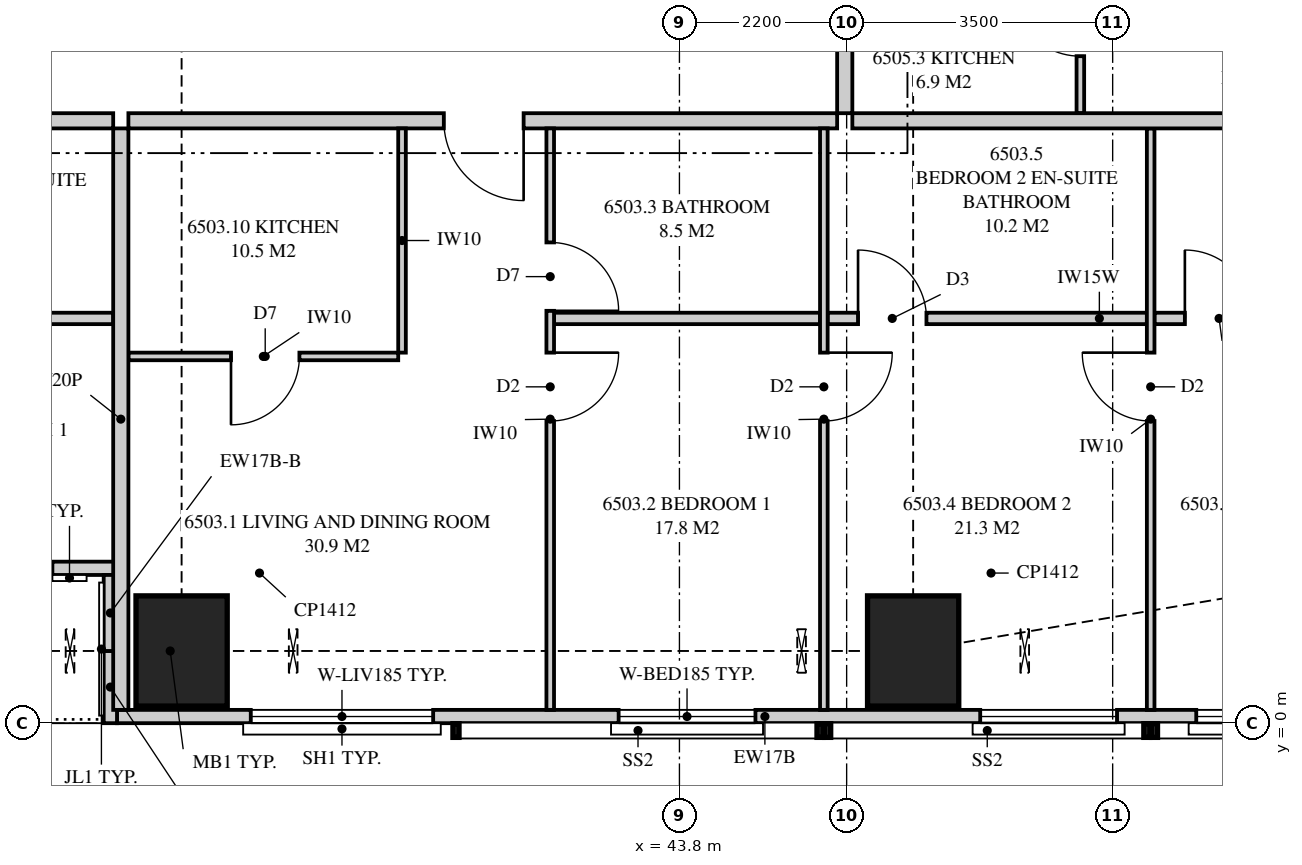
"""IFC4 building model, lengths in metres.
Left out: names, types, materials, properties, quantities, classifications, styles, units other than length and angle.
Written with IfcOpenShell. Run it as: python <this file> out.ifc"""

import sys

from ifc_helpers import new_model, si_unit, direction, frame, frame_2d, origin, origin_2d, place, context, subcontext, project, spatial, polyline, rectangle, outline, extrude, element, fill, save


model = new_model("IFC4")
c1 = context("Model", 3, precision=1e-05, world=origin(), true_north=direction((0.0, 1.0)))
c2 = subcontext(c1, "Body", "Model", "MODEL_VIEW")
j1 = project(units=[si_unit("LENGTHUNIT", "METRE"), si_unit("PLANEANGLEUNIT", "RADIAN")], contexts=[c1])
p1 = place(None, origin())
s1 = spatial("IfcSite", under=j1, at=p1, CompositionType="ELEMENT")
p2 = place(p1, origin())
s2 = spatial("IfcBuilding", under=s1, at=p2, CompositionType="ELEMENT")
p3 = place(p2, frame((0.0, 0.0, 238.95)))
s3 = spatial("IfcBuildingStorey", under=s2, at=p3, CompositionType="ELEMENT", Elevation=238.95)
for number, where, z_axis, x_axis in (
    (1, (37.25, 0.95, 0.0), (0.0, 0.0, 1.0), (0.0, 1.0, 0.0)),
    (2, (46.875, 0.95, 0.0), (0.0, 0.0, 1.0), (0.0, 1.0, 0.0)),
):
    element("IfcColumn", number, at=place(p3, frame(where, z_axis=z_axis, x_axis=x_axis)), inside=s3, PredefinedType="COLUMN", context=c2, shape_type="SweptSolid", body=[
        extrude(rectangle(XDim=1.45, YDim=1.2, at=origin_2d()), origin(), (0.0, 0.0, 1.0), 3.5),
    ])
p4 = place(p3, frame((36.4, 0.087, 0.0), z_axis=(0.0, 0.0, 1.0), x_axis=(1.0, 0.0, 0.0)))
e3 = element("IfcWall", 3, at=p4, inside=s3, PredefinedType="SOLIDWALL", context=c2, shape_type="SweptSolid", body=[
    extrude(outline(polyline([(0.0, 0.0), (17.049, 0.0), (17.049, 3.26), (10.69, 3.26), (10.69, 2.3), (10.606, 2.3), (10.606, 3.26), (10.475, 3.26), (10.475, 2.3), (0.0, 2.3), (0.0, 0.0)])), frame((0.0, 0.087, 0.0), z_axis=(0.0, -1.0, 0.0), x_axis=(1.0, 0.0, 0.0)), (0.0, 0.0, 1.0), 0.175),
])
p5 = place(p4, frame((1.76, 0.0, 0.4)))
e4 = element("IfcOpeningElement", 4, at=p5, cuts=e3, PredefinedType="OPENING", context=c2, shape_type="SweptSolid", body=[
    extrude(rectangle(XDim=2.4, YDim=1.85, at=frame_2d((1.2, 0.925))), frame((0.0, 0.097, 0.0), z_axis=(0.0, -1.0, 0.0), x_axis=(1.0, 0.0, 0.0)), (0.0, 0.0, 1.0), 0.195),
])
p6 = place(p4, frame((6.6, 0.0, 0.4)))
e5 = element("IfcOpeningElement", 5, at=p6, cuts=e3, PredefinedType="OPENING", context=c2, shape_type="SweptSolid", body=[
    extrude(rectangle(XDim=1.8, YDim=1.85, at=frame_2d((0.9, 0.925))), frame((0.0, 0.097, 0.0), z_axis=(0.0, -1.0, 0.0), x_axis=(1.0, 0.0, 0.0)), (0.0, 0.0, 1.0), 0.195),
])
p7 = place(p4, frame((11.357, 0.0, 0.4)))
e6 = element("IfcOpeningElement", 6, at=p7, cuts=e3, PredefinedType="OPENING", context=c2, shape_type="SweptSolid", body=[
    extrude(rectangle(XDim=1.8, YDim=1.85, at=frame_2d((0.9, 0.925))), frame((0.0, 0.097, 0.0), z_axis=(0.0, -1.0, 0.0), x_axis=(1.0, 0.0, 0.0)), (0.0, 0.0, 1.0), 0.195),
])
p8 = place(p4, frame((14.2, 0.0, 0.4)))
e7 = element("IfcOpeningElement", 7, at=p8, cuts=e3, PredefinedType="OPENING", context=c2, shape_type="SweptSolid", body=[
    extrude(rectangle(XDim=1.8, YDim=1.85, at=frame_2d((0.9, 0.925))), frame((0.0, 0.097, 0.0), z_axis=(0.0, -1.0, 0.0), x_axis=(1.0, 0.0, 0.0)), (0.0, 0.0, 1.0), 0.195),
])
p9 = place(p3, frame((32.9, 2.038, 0.0), z_axis=(0.0, 0.0, 1.0), x_axis=(1.0, 0.0, 0.0)))
e8 = element("IfcWall", 8, at=p9, inside=s3, PredefinedType="SOLIDWALL", context=c2, shape_type="SweptSolid", body=[
    extrude(outline(polyline([(0.0, 0.0), (3.5, 0.0), (3.5, 2.66), (3.15, 2.66), (3.15, 3.26), (0.0, 3.26), (0.0, 0.0)])), frame((0.0, 0.087, 0.0), z_axis=(0.0, -1.0, 0.0), x_axis=(1.0, 0.0, 0.0)), (0.0, 0.0, 1.0), 0.175),
])
p10 = place(p9, frame((0.85, 0.0, 0.0)))
e9 = element("IfcOpeningElement", 9, at=p10, cuts=e8, PredefinedType="OPENING", context=c2, shape_type="SweptSolid", body=[
    extrude(rectangle(XDim=1.8, YDim=2.25, at=frame_2d((0.9, 1.125))), frame((0.0, 0.097, 0.0), z_axis=(0.0, -1.0, 0.0), x_axis=(1.0, 0.0, 0.0)), (0.0, 0.0, 1.0), 0.195),
])
p11 = place(p3, frame((36.312, 0.0, 0.0), z_axis=(0.0, 0.0, 1.0), x_axis=(0.0, 1.0, 0.0)))
e10 = element("IfcWall", 10, at=p11, inside=s3, PredefinedType="SOLIDWALL", context=c2, shape_type="SweptSolid", body=[
    extrude(outline(polyline([(0.0, 0.0), (0.95, 0.0), (0.95, 2.3), (0.15, 2.3), (0.15, 3.26), (0.0, 3.26), (0.0, 0.0)])), frame((0.0, 0.087, 0.0), z_axis=(0.0, -1.0, 0.0), x_axis=(1.0, 0.0, 0.0)), (0.0, 0.0, 1.0), 0.175),
])
p12 = place(p3, frame((36.312, 0.95, 0.0), z_axis=(0.0, 0.0, 1.0), x_axis=(0.0, 1.0, 0.0)))
e11 = element("IfcWall", 11, at=p12, inside=s3, PredefinedType="SOLIDWALL", context=c2, shape_type="SweptSolid", body=[
    extrude(outline(polyline([(0.0, 0.0), (1.0, 0.0), (1.0, 2.66), (0.8, 2.66), (0.8, 2.3), (0.0, 2.3), (0.0, 0.0)])), frame((0.0, 0.087, 0.0), z_axis=(0.0, -1.0, 0.0), x_axis=(1.0, 0.0, 0.0)), (0.0, 0.0, 1.0), 0.175),
])
p13 = place(p3, frame((36.45, 0.175, 0.0), z_axis=(0.0, 0.0, 1.0), x_axis=(0.0, 1.0, 0.0)))
e12 = element("IfcWall", 12, at=p13, inside=s3, PredefinedType="PARTITIONING", context=c2, shape_type="SweptSolid", body=[
    extrude(outline(polyline([(0.0, 0.0), (7.65, 0.0), (7.65, 3.26), (7.65, 2.66), (1.685, 2.66), (1.685, 2.3), (0.0, 2.3), (0.0, 3.26), (0.0, 0.0)])), frame((0.0, 0.1, 0.0), z_axis=(0.0, -1.0, 0.0), x_axis=(1.0, 0.0, 0.0)), (0.0, 0.0, 1.0), 0.2),
])
p14 = place(p3, frame((26.7, 7.925, 0.0), z_axis=(0.0, 0.0, 1.0), x_axis=(1.0, 0.0, 0.0)))
e13 = element("IfcWall", 13, at=p14, inside=s3, PredefinedType="PARTITIONING", context=c2, shape_type="SweptSolid", body=[
    extrude(outline(polyline([(0.0, 0.0), (9.65, 0.0), (9.65, 3.26), (9.65, 2.66), (9.24, 2.66), (9.24, 3.26), (2.235, 3.26), (2.235, 2.66), (0.0, 2.66), (0.0, 3.26), (0.0, 0.0)])), frame((0.0, 0.1, 0.0), z_axis=(0.0, -1.0, 0.0), x_axis=(1.0, 0.0, 0.0)), (0.0, 0.0, 1.0), 0.2),
])
p15 = place(p14, frame((4.325, 0.0, 0.0)))
e14 = element("IfcOpeningElement", 14, at=p15, cuts=e13, PredefinedType="OPENING", context=c2, shape_type="SweptSolid", body=[
    extrude(rectangle(XDim=1.05, YDim=2.2, at=frame_2d((0.525, 1.1))), frame((0.0, 0.11, 0.0), z_axis=(0.0, -1.0, 0.0), x_axis=(1.0, 0.0, 0.0)), (0.0, 0.0, 1.0), 0.22),
])
p16 = place(p3, frame((32.9, 5.325, 0.0), z_axis=(0.0, 0.0, 1.0), x_axis=(1.0, 0.0, 0.0)))
e15 = element("IfcWall", 15, at=p16, inside=s3, PredefinedType="PLUMBINGWALL", context=c2, shape_type="SweptSolid", body=[
    extrude(outline(polyline([(0.0, 0.0), (3.45, 0.0), (3.45, 3.26), (3.45, 2.66), (3.065, 2.66), (3.065, 3.26), (0.0, 3.26), (0.0, 0.0)])), frame((0.0, 0.075, 0.0), z_axis=(0.0, -1.0, 0.0), x_axis=(1.0, 0.0, 0.0)), (0.0, 0.0, 1.0), 0.15),
])
p17 = place(p16, frame((0.4, 0.0, 0.0)))
e16 = element("IfcOpeningElement", 16, at=p17, cuts=e15, PredefinedType="OPENING", context=c2, shape_type="SweptSolid", body=[
    extrude(rectangle(XDim=0.9, YDim=2.1, at=frame_2d((0.45, 1.05))), frame((0.0, 0.085, 0.0), z_axis=(0.0, -1.0, 0.0), x_axis=(1.0, 0.0, 0.0)), (0.0, 0.0, 1.0), 0.17),
])
p18 = place(p3, frame((36.55, 7.925, 0.0), z_axis=(0.0, 0.0, 1.0), x_axis=(1.0, 0.0, 0.0)))
e17 = element("IfcWall", 17, at=p18, inside=s3, PredefinedType="PARTITIONING", context=c2, shape_type="SweptSolid", body=[
    extrude(outline(polyline([(0.0, 0.0), (9.325, 0.0), (9.325, 3.26), (9.325, 2.66), (9.015, 2.66), (9.015, 3.26), (2.01, 3.26), (2.01, 2.66), (0.0, 2.66), (0.0, 3.26), (0.0, 0.0)])), frame((0.0, 0.1, 0.0), z_axis=(0.0, -1.0, 0.0), x_axis=(1.0, 0.0, 0.0)), (0.0, 0.0, 1.0), 0.2),
])
p19 = place(p18, frame((4.15, 0.0, 0.0)))
e18 = element("IfcOpeningElement", 18, at=p19, cuts=e17, PredefinedType="OPENING", context=c2, shape_type="SweptSolid", body=[
    extrude(rectangle(XDim=1.05, YDim=2.2, at=frame_2d((0.525, 1.1))), frame((0.0, 0.11, 0.0), z_axis=(0.0, -1.0, 0.0), x_axis=(1.0, 0.0, 0.0)), (0.0, 0.0, 1.0), 0.22),
])
p20 = place(p3, frame((42.1, 0.175, 0.0), z_axis=(0.0, 0.0, 1.0), x_axis=(0.0, 1.0, 0.0)))
e19 = element("IfcWall", 19, at=p20, inside=s3, PredefinedType="PARTITIONING", context=c2, shape_type="SweptSolid", body=[
    extrude(outline(polyline([(0.0, 0.0), (7.65, 0.0), (7.65, 3.26), (1.635, 3.26), (1.635, 2.3), (0.0, 2.3), (0.0, 3.26), (0.0, 0.0)])), frame((0.0, 0.05, 0.0), z_axis=(0.0, -1.0, 0.0), x_axis=(1.0, 0.0, 0.0)), (0.0, 0.0, 1.0), 0.1),
])
p21 = place(p20, frame((3.8, 0.0, 0.0)))
e20 = element("IfcOpeningElement", 20, at=p21, cuts=e19, PredefinedType="OPENING", context=c2, shape_type="SweptSolid", body=[
    extrude(rectangle(XDim=0.9, YDim=2.1, at=frame_2d((0.45, 1.05))), frame((0.0, 0.06, 0.0), z_axis=(0.0, -1.0, 0.0), x_axis=(1.0, 0.0, 0.0)), (0.0, 0.0, 1.0), 0.12),
])
p22 = place(p20, frame((5.25, 0.0, 0.0)))
e21 = element("IfcOpeningElement", 21, at=p22, cuts=e19, PredefinedType="OPENING", context=c2, shape_type="SweptSolid", body=[
    extrude(rectangle(XDim=0.9, YDim=2.1, at=frame_2d((0.45, 1.05))), frame((0.0, 0.06, 0.0), z_axis=(0.0, -1.0, 0.0), x_axis=(1.0, 0.0, 0.0)), (0.0, 0.0, 1.0), 0.12),
])
p23 = place(p3, frame((45.7, 0.175, 0.0), z_axis=(0.0, 0.0, 1.0), x_axis=(0.0, 1.0, 0.0)))
e22 = element("IfcWall", 22, at=p23, inside=s3, PredefinedType="PARTITIONING", context=c2, shape_type="SweptSolid", body=[
    extrude(outline(polyline([(0.0, 0.0), (7.65, 0.0), (7.65, 3.26), (7.65, 2.66), (1.635, 2.66), (1.635, 2.3), (0.0, 2.3), (0.0, 3.26), (0.0, 0.0)])), frame((0.0, 0.05, 0.0), z_axis=(0.0, -1.0, 0.0), x_axis=(1.0, 0.0, 0.0)), (0.0, 0.0, 1.0), 0.1),
])
p24 = place(p23, frame((3.8, 0.0, 0.0)))
e23 = element("IfcOpeningElement", 23, at=p24, cuts=e22, PredefinedType="OPENING", context=c2, shape_type="SweptSolid", body=[
    extrude(rectangle(XDim=0.9, YDim=2.1, at=frame_2d((0.45, 1.05))), frame((0.0, 0.06, 0.0), z_axis=(0.0, -1.0, 0.0), x_axis=(1.0, 0.0, 0.0)), (0.0, 0.0, 1.0), 0.12),
])
p25 = place(p3, frame((50.0, 0.175, 0.0), z_axis=(0.0, 0.0, 1.0), x_axis=(0.0, 1.0, 0.0)))
e24 = element("IfcWall", 24, at=p25, inside=s3, PredefinedType="PARTITIONING", context=c2, shape_type="SweptSolid", body=[
    extrude(outline(polyline([(0.0, 0.0), (7.65, 0.0), (7.65, 3.26), (2.177, 3.26), (2.177, 2.3), (0.432, 2.3), (0.432, 3.26), (0.0, 3.26), (0.0, 0.0)])), frame((0.0, 0.05, 0.0), z_axis=(0.0, -1.0, 0.0), x_axis=(1.0, 0.0, 0.0)), (0.0, 0.0, 1.0), 0.1),
])
p26 = place(p25, frame((3.8, 0.0, 0.0)))
e25 = element("IfcOpeningElement", 25, at=p26, cuts=e24, PredefinedType="OPENING", context=c2, shape_type="SweptSolid", body=[
    extrude(rectangle(XDim=0.9, YDim=2.1, at=frame_2d((0.45, 1.05))), frame((0.0, 0.06, 0.0), z_axis=(0.0, -1.0, 0.0), x_axis=(1.0, 0.0, 0.0)), (0.0, 0.0, 1.0), 0.12),
])
p27 = place(p3, frame((42.15, 5.325, 0.0), z_axis=(0.0, 0.0, 1.0), x_axis=(1.0, 0.0, 0.0)))
e26 = element("IfcWall", 26, at=p27, inside=s3, PredefinedType="PLUMBINGWALL", context=c2, shape_type="SweptSolid", body=[
    extrude(outline(polyline([(0.0, 0.0), (3.5, 0.0), (3.5, 3.26), (3.5, 2.66), (3.44, 2.66), (3.44, 3.26), (0.0, 3.26), (0.0, 0.0)])), frame((0.0, 0.075, 0.0), z_axis=(0.0, -1.0, 0.0), x_axis=(1.0, 0.0, 0.0)), (0.0, 0.0, 1.0), 0.15),
])
p28 = place(p3, frame((45.75, 5.325, 0.0), z_axis=(0.0, 0.0, 1.0), x_axis=(1.0, 0.0, 0.0)))
e27 = element("IfcWall", 27, at=p28, inside=s3, PredefinedType="PLUMBINGWALL", context=c2, shape_type="SweptSolid", body=[
    extrude(outline(polyline([(0.0, 0.0), (4.2, 0.0), (4.2, 3.26), (2.41, 3.26), (2.41, 2.66), (0.0, 2.66), (0.0, 3.26), (0.0, 0.0)])), frame((0.0, 0.075, 0.0), z_axis=(0.0, -1.0, 0.0), x_axis=(1.0, 0.0, 0.0)), (0.0, 0.0, 1.0), 0.15),
])
p29 = place(p28, frame((0.4, 0.0, 0.0)))
e28 = element("IfcOpeningElement", 28, at=p29, cuts=e27, PredefinedType="OPENING", context=c2, shape_type="SweptSolid", body=[
    extrude(rectangle(XDim=0.9, YDim=2.1, at=frame_2d((0.45, 1.05))), frame((0.0, 0.085, 0.0), z_axis=(0.0, -1.0, 0.0), x_axis=(1.0, 0.0, 0.0)), (0.0, 0.0, 1.0), 0.17),
])
p30 = place(p3, frame((50.05, 5.325, 0.0), z_axis=(0.0, 0.0, 1.0), x_axis=(1.0, 0.0, 0.0)))
e29 = element("IfcWall", 29, at=p30, inside=s3, PredefinedType="PLUMBINGWALL", context=c2, shape_type="SweptSolid", body=[
    extrude(rectangle(XDim=2.9, YDim=0.15, at=frame_2d((1.45, 0.0))), origin(), (0.0, 0.0, 1.0), 3.26),
])
p31 = place(p30, frame((0.4, 0.0, 0.0)))
e30 = element("IfcOpeningElement", 30, at=p31, cuts=e29, PredefinedType="OPENING", context=c2, shape_type="SweptSolid", body=[
    extrude(rectangle(XDim=0.9, YDim=2.1, at=frame_2d((0.45, 1.05))), frame((0.0, 0.085, 0.0), z_axis=(0.0, -1.0, 0.0), x_axis=(1.0, 0.0, 0.0)), (0.0, 0.0, 1.0), 0.17),
])
p32 = place(p3, frame((36.55, 4.825, 0.0), z_axis=(0.0, 0.0, 1.0), x_axis=(1.0, 0.0, 0.0)))
e31 = element("IfcWall", 31, at=p32, inside=s3, PredefinedType="PARTITIONING", context=c2, shape_type="SweptSolid", body=[
    extrude(outline(polyline([(0.0, 0.0), (3.55, 0.0), (3.55, 3.26), (1.96, 3.26), (1.96, 2.66), (0.0, 2.66), (0.0, 3.26), (0.0, 0.0)])), frame((0.0, 0.05, 0.0), z_axis=(0.0, -1.0, 0.0), x_axis=(1.0, 0.0, 0.0)), (0.0, 0.0, 1.0), 0.1),
])
p33 = place(p32, frame((1.35, 0.0, 0.0)))
e32 = element("IfcOpeningElement", 32, at=p33, cuts=e31, PredefinedType="OPENING", context=c2, shape_type="SweptSolid", body=[
    extrude(rectangle(XDim=0.9, YDim=2.1, at=frame_2d((0.45, 1.05))), frame((0.0, 0.06, 0.0), z_axis=(0.0, -1.0, 0.0), x_axis=(1.0, 0.0, 0.0)), (0.0, 0.0, 1.0), 0.12),
])
p34 = place(p3, frame((40.15, 4.875, 0.0), z_axis=(0.0, 0.0, 1.0), x_axis=(0.0, 1.0, 0.0)))
e33 = element("IfcWall", 33, at=p34, inside=s3, PredefinedType="PARTITIONING", context=c2, shape_type="SweptSolid", body=[
    extrude(rectangle(XDim=2.95, YDim=0.1, at=frame_2d((1.475, 0.0))), origin(), (0.0, 0.0, 1.0), 3.26),
])
p35 = place(p3, frame((46.075, 7.925, 0.0), z_axis=(0.0, 0.0, 1.0), x_axis=(1.0, 0.0, 0.0)))
e34 = element("IfcWall", 34, at=p35, inside=s3, PredefinedType="PARTITIONING", context=c2, shape_type="SweptSolid", body=[
    extrude(outline(polyline([(0.0, 0.0), (10.425, 0.0), (10.425, 3.26), (9.8, 3.26), (9.8, 2.3), (7.968, 2.3), (7.968, 3.26), (2.11, 3.26), (2.11, 2.66), (0.0, 2.66), (0.0, 3.26), (0.0, 0.0)])), frame((0.0, 0.1, 0.0), z_axis=(0.0, -1.0, 0.0), x_axis=(1.0, 0.0, 0.0)), (0.0, 0.0, 1.0), 0.2),
])
p36 = place(p3, frame((45.975, 8.025, 0.0), z_axis=(0.0, 0.0, 1.0), x_axis=(0.0, 1.0, 0.0)))
e35 = element("IfcWall", 35, at=p36, inside=s3, PredefinedType="PARTITIONING", context=c2, shape_type="SweptSolid", body=[
    extrude(outline(polyline([(0.0, 0.0), (6.025, 0.0), (6.025, 3.26), (6.025, 2.66), (5.085, 2.66), (0.0, 2.66), (0.0, 3.26), (0.0, 0.0)])), frame((0.0, 0.1, 0.0), z_axis=(0.0, -1.0, 0.0), x_axis=(1.0, 0.0, 0.0)), (0.0, 0.0, 1.0), 0.2),
])
p37 = place(p36, frame((2.512, 0.0, 0.0)))
e36 = element("IfcOpeningElement", 36, at=p37, cuts=e35, PredefinedType="OPENING", context=c2, shape_type="SweptSolid", body=[
    extrude(rectangle(XDim=1.05, YDim=2.2, at=frame_2d((0.525, 1.1))), frame((0.0, 0.11, 0.0), z_axis=(0.0, -1.0, 0.0), x_axis=(1.0, 0.0, 0.0)), (0.0, 0.0, 1.0), 0.22),
])
p38 = place(p3, frame((49.075, 8.025, 0.0), z_axis=(0.0, 0.0, 1.0), x_axis=(0.0, 1.0, 0.0)))
e37 = element("IfcWall", 37, at=p38, inside=s3, PredefinedType="PARTITIONING", context=c2, shape_type="SweptSolid", body=[
    extrude(rectangle(XDim=2.35, YDim=0.1, at=frame_2d((1.175, 0.0))), origin(), (0.0, 0.0, 1.0), 3.26),
])
p39 = place(p38, frame((0.75, 0.0, 0.0)))
e38 = element("IfcOpeningElement", 38, at=p39, cuts=e37, PredefinedType="OPENING", context=c2, shape_type="SweptSolid", body=[
    extrude(rectangle(XDim=0.9, YDim=2.1, at=frame_2d((0.45, 1.05))), frame((0.0, 0.06, 0.0), z_axis=(0.0, -1.0, 0.0), x_axis=(1.0, 0.0, 0.0)), (0.0, 0.0, 1.0), 0.12),
])
p40 = place(p5, origin())
e39 = element("IfcWindow", 39, at=p40, inside=s3, PartitioningType="SINGLE_PANEL", PredefinedType="WINDOW", context=c2, shape_type="SweptSolid", body=[
    extrude(rectangle(XDim=2.4, YDim=1.85, at=frame_2d((1.2, 0.925))), frame((0.0, 0.03, 0.0), z_axis=(0.0, -1.0, 0.0), x_axis=(1.0, 0.0, 0.0)), (0.0, 0.0, 1.0), 0.06),
])
fill(e4, e39)
p41 = place(p6, origin())
e40 = element("IfcWindow", 40, at=p41, inside=s3, PartitioningType="SINGLE_PANEL", PredefinedType="WINDOW", context=c2, shape_type="SweptSolid", body=[
    extrude(rectangle(XDim=1.8, YDim=1.85, at=frame_2d((0.9, 0.925))), frame((0.0, 0.03, 0.0), z_axis=(0.0, -1.0, 0.0), x_axis=(1.0, 0.0, 0.0)), (0.0, 0.0, 1.0), 0.06),
])
fill(e5, e40)
p42 = place(p7, origin())
e41 = element("IfcWindow", 41, at=p42, inside=s3, PartitioningType="SINGLE_PANEL", PredefinedType="WINDOW", context=c2, shape_type="SweptSolid", body=[
    extrude(rectangle(XDim=1.8, YDim=1.85, at=frame_2d((0.9, 0.925))), frame((0.0, 0.03, 0.0), z_axis=(0.0, -1.0, 0.0), x_axis=(1.0, 0.0, 0.0)), (0.0, 0.0, 1.0), 0.06),
])
fill(e6, e41)
p43 = place(p8, origin())
e42 = element("IfcWindow", 42, at=p43, inside=s3, PartitioningType="SINGLE_PANEL", PredefinedType="WINDOW", context=c2, shape_type="SweptSolid", body=[
    extrude(rectangle(XDim=1.8, YDim=1.85, at=frame_2d((0.9, 0.925))), frame((0.0, 0.03, 0.0), z_axis=(0.0, -1.0, 0.0), x_axis=(1.0, 0.0, 0.0)), (0.0, 0.0, 1.0), 0.06),
])
fill(e7, e42)
p44 = place(p19, frame((1.05, 0.0, 0.0), z_axis=(0.0, 0.0, 1.0), x_axis=(-1.0, 0.0, 0.0)))
e43 = element("IfcDoor", 43, at=p44, inside=s3, OperationType="SINGLE_SWING_LEFT", PredefinedType="DOOR", context=c2, shape_type="SweptSolid", body=[
    extrude(rectangle(XDim=1.05, YDim=2.2, at=frame_2d((0.525, 1.1))), frame((0.0, 0.025, 0.0), z_axis=(0.0, -1.0, 0.0), x_axis=(1.0, 0.0, 0.0)), (0.0, 0.0, 1.0), 0.05),
])
fill(e18, e43)
p45 = place(p21, frame((0.9, 0.0, 0.0), z_axis=(0.0, 0.0, 1.0), x_axis=(-1.0, 0.0, 0.0)))
e44 = element("IfcDoor", 44, at=p45, inside=s3, OperationType="SINGLE_SWING_LEFT", PredefinedType="DOOR", context=c2, shape_type="SweptSolid", body=[
    extrude(rectangle(XDim=0.9, YDim=2.1, at=frame_2d((0.45, 1.05))), frame((0.0, 0.025, 0.0), z_axis=(0.0, -1.0, 0.0), x_axis=(1.0, 0.0, 0.0)), (0.0, 0.0, 1.0), 0.05),
])
fill(e20, e44)
p46 = place(p22, frame((0.9, 0.0, 0.0), z_axis=(0.0, 0.0, 1.0), x_axis=(-1.0, 0.0, 0.0)))
e45 = element("IfcDoor", 45, at=p46, inside=s3, OperationType="SINGLE_SWING_RIGHT", PredefinedType="DOOR", context=c2, shape_type="SweptSolid", body=[
    extrude(rectangle(XDim=0.9, YDim=2.1, at=frame_2d((0.45, 1.05))), frame((0.0, 0.025, 0.0), z_axis=(0.0, -1.0, 0.0), x_axis=(1.0, 0.0, 0.0)), (0.0, 0.0, 1.0), 0.05),
])
fill(e21, e45)
p47 = place(p24, frame((0.9, 0.0, 0.0), z_axis=(0.0, 0.0, 1.0), x_axis=(-1.0, 0.0, 0.0)))
e46 = element("IfcDoor", 46, at=p47, inside=s3, OperationType="SINGLE_SWING_LEFT", PredefinedType="DOOR", context=c2, shape_type="SweptSolid", body=[
    extrude(rectangle(XDim=0.9, YDim=2.1, at=frame_2d((0.45, 1.05))), frame((0.0, 0.025, 0.0), z_axis=(0.0, -1.0, 0.0), x_axis=(1.0, 0.0, 0.0)), (0.0, 0.0, 1.0), 0.05),
])
fill(e23, e46)
p48 = place(p29, origin())
e47 = element("IfcDoor", 47, at=p48, inside=s3, OperationType="SINGLE_SWING_LEFT", PredefinedType="DOOR", context=c2, shape_type="SweptSolid", body=[
    extrude(rectangle(XDim=0.9, YDim=2.1, at=frame_2d((0.45, 1.05))), frame((0.0, 0.025, 0.0), z_axis=(0.0, -1.0, 0.0), x_axis=(1.0, 0.0, 0.0)), (0.0, 0.0, 1.0), 0.05),
])
fill(e28, e47)
p49 = place(p26, origin())
e48 = element("IfcDoor", 48, at=p49, inside=s3, OperationType="SINGLE_SWING_RIGHT", PredefinedType="DOOR", context=c2, shape_type="SweptSolid", body=[
    extrude(rectangle(XDim=0.9, YDim=2.1, at=frame_2d((0.45, 1.05))), frame((0.0, 0.025, 0.0), z_axis=(0.0, -1.0, 0.0), x_axis=(1.0, 0.0, 0.0)), (0.0, 0.0, 1.0), 0.05),
])
fill(e25, e48)
p50 = place(p31, origin())
e49 = element("IfcDoor", 49, at=p50, inside=s3, OperationType="SINGLE_SWING_LEFT", PredefinedType="DOOR", context=c2, shape_type="SweptSolid", body=[
    extrude(rectangle(XDim=0.9, YDim=2.1, at=frame_2d((0.45, 1.05))), frame((0.0, 0.025, 0.0), z_axis=(0.0, -1.0, 0.0), x_axis=(1.0, 0.0, 0.0)), (0.0, 0.0, 1.0), 0.05),
])
fill(e30, e49)
p51 = place(p33, frame((0.9, 0.0, 0.0), z_axis=(0.0, 0.0, 1.0), x_axis=(-1.0, 0.0, 0.0)))
e50 = element("IfcDoor", 50, at=p51, inside=s3, OperationType="SINGLE_SWING_RIGHT", PredefinedType="DOOR", context=c2, shape_type="SweptSolid", body=[
    extrude(rectangle(XDim=0.9, YDim=2.1, at=frame_2d((0.45, 1.05))), frame((0.0, 0.025, 0.0), z_axis=(0.0, -1.0, 0.0), x_axis=(1.0, 0.0, 0.0)), (0.0, 0.0, 1.0), 0.05),
])
fill(e32, e50)
p52 = place(p39, origin())
e51 = element("IfcDoor", 51, at=p52, inside=s3, OperationType="SINGLE_SWING_RIGHT", PredefinedType="DOOR", context=c2, shape_type="SweptSolid", body=[
    extrude(rectangle(XDim=0.9, YDim=2.1, at=frame_2d((0.45, 1.05))), frame((0.0, 0.025, 0.0), z_axis=(0.0, -1.0, 0.0), x_axis=(1.0, 0.0, 0.0)), (0.0, 0.0, 1.0), 0.05),
])
fill(e38, e51)
save(model, sys.argv[1])
